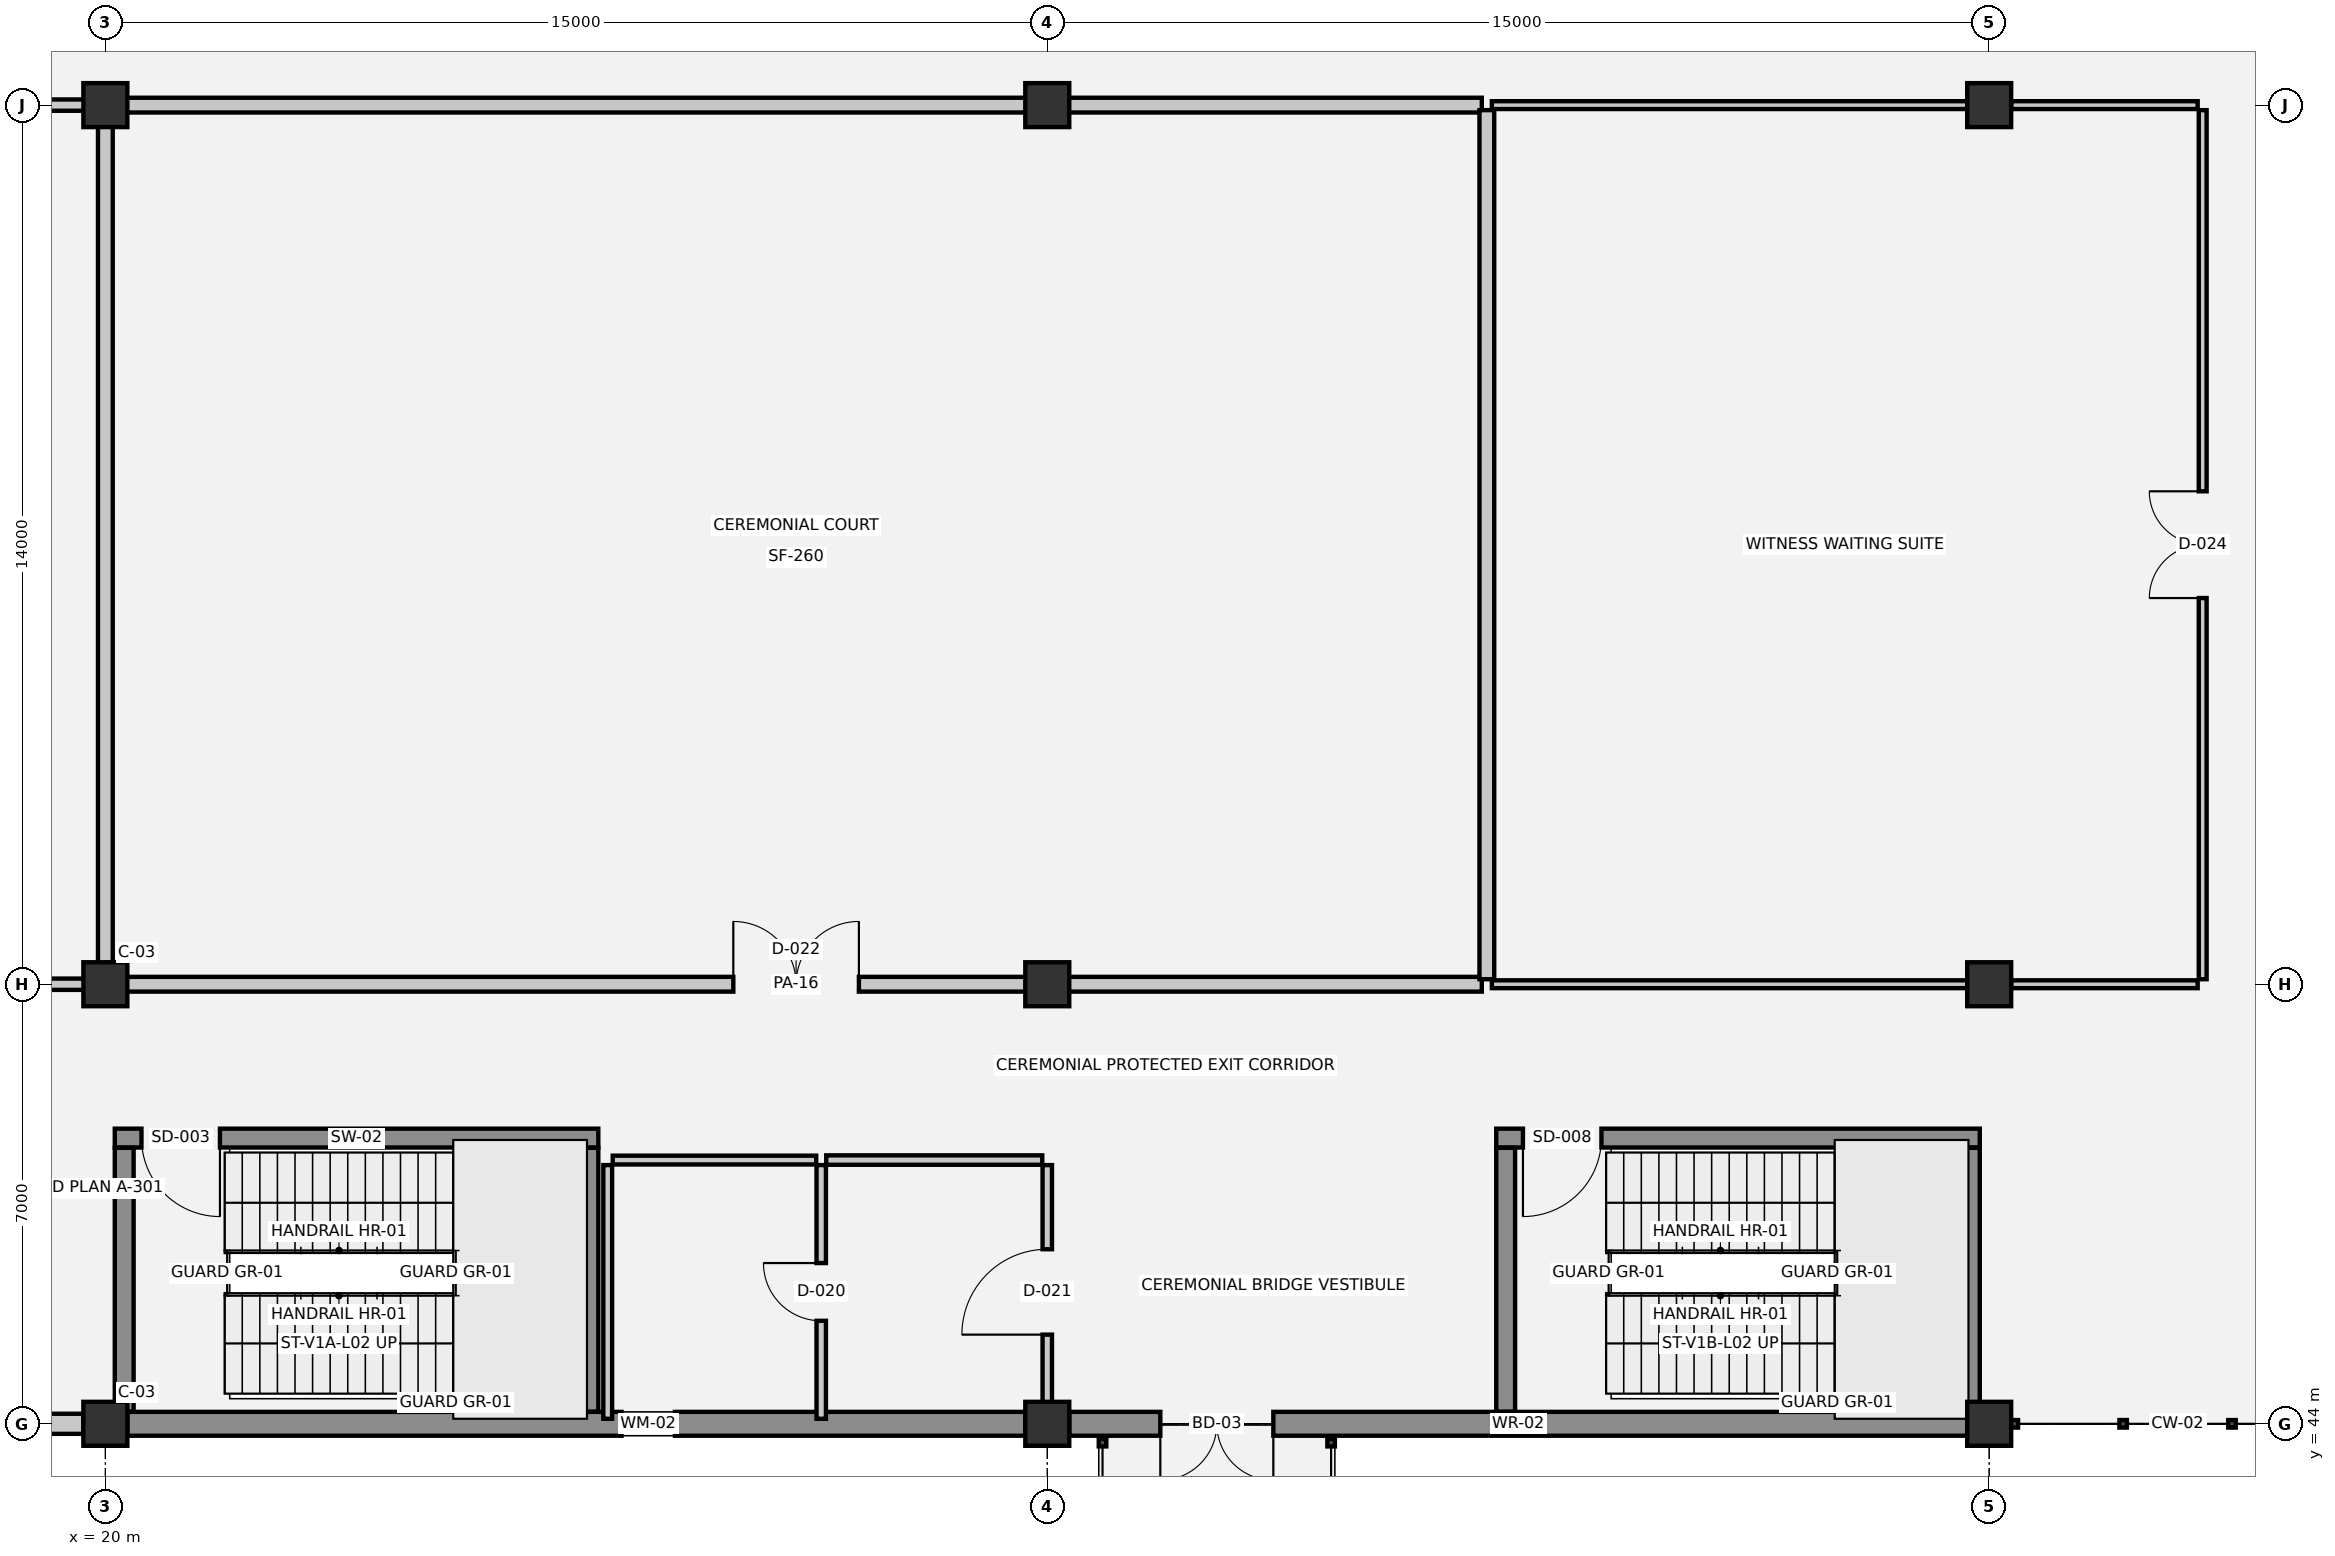
"""IFC4 building model, lengths in metres.
Left out: names, types, materials, properties, quantities, classifications, styles, units other than length and angle.
Written with IfcOpenShell. Run it as: python <this file> out.ifc"""

import sys

from ifc_helpers import new_model, si_unit, direction, frame, frame_2d, origin, origin_2d, place, context, subcontext, project, spatial, rectangle, extrude, element, fill, save


model = new_model("IFC4")
c1 = context("Model", 3, precision=1e-05, world=origin(), true_north=direction((0.0, 1.0)))
c2 = subcontext(c1, "Body", "Model", "MODEL_VIEW")
j1 = project(units=[si_unit("LENGTHUNIT", "METRE"), si_unit("PLANEANGLEUNIT", "RADIAN")], contexts=[c1])
p1 = place(None, origin())
s1 = spatial("IfcSite", under=j1, at=p1, CompositionType="ELEMENT")
p2 = place(p1, origin())
s2 = spatial("IfcBuilding", under=s1, at=p2, CompositionType="ELEMENT")
p3 = place(p2, frame((0.0, 0.0, 5.4)))
s3 = spatial("IfcBuildingStorey", under=s2, at=p3, CompositionType="ELEMENT", Elevation=5.4)
for number, where, z_axis, x_axis in (
    (1, (20.0, 44.0, 0.0), (0.0, 0.0, 1.0), (1.0, 0.0, 0.0)),
    (2, (20.0, 51.0, 0.0), (0.0, 0.0, 1.0), (1.0, 0.0, 0.0)),
    (3, (20.0, 65.0, 0.0), (0.0, 0.0, 1.0), (1.0, 0.0, 0.0)),
    (4, (35.0, 44.0, 0.0), (0.0, 0.0, 1.0), (1.0, 0.0, 0.0)),
    (5, (35.0, 51.0, 0.0), (0.0, 0.0, 1.0), (1.0, 0.0, 0.0)),
    (6, (35.0, 65.0, 0.0), (0.0, 0.0, 1.0), (1.0, 0.0, 0.0)),
    (7, (50.0, 44.0, 0.0), (0.0, 0.0, 1.0), (1.0, 0.0, 0.0)),
    (8, (50.0, 51.0, 0.0), (0.0, 0.0, 1.0), (1.0, 0.0, 0.0)),
    (9, (50.0, 65.0, 0.0), (0.0, 0.0, 1.0), (1.0, 0.0, 0.0)),
):
    element("IfcColumn", number, at=place(p3, frame(where, z_axis=z_axis, x_axis=x_axis)), inside=s3, PredefinedType="COLUMN", context=c2, shape_type="SweptSolid", body=[
        extrude(rectangle(XDim=0.7, YDim=0.7, at=origin_2d()), origin(), (0.0, 0.0, 1.0), 4.5),
    ])
p4 = place(p3, frame((49.65, 44.0, 0.0), z_axis=(0.0, 0.0, 1.0), x_axis=(-1.0, 0.0, 0.0)))
e10 = element("IfcWall", 10, at=p4, inside=s3, PredefinedType="STANDARD", context=c2, shape_type="SweptSolid", body=[
    extrude(rectangle(XDim=14.3, YDim=0.38, at=frame_2d((7.15, 0.0))), origin(), (0.0, 0.0, 1.0), 3.11),
])
p5 = place(p4, frame((11.05, 0.0, 0.0)))
e11 = element("IfcOpeningElement", 11, at=p5, cuts=e10, PredefinedType="OPENING", context=c2, shape_type="SweptSolid", body=[
    extrude(rectangle(XDim=1.8, YDim=2.25, at=frame_2d((0.9, 1.125))), frame((0.0, 0.2, 0.0), z_axis=(0.0, -1.0, 0.0), x_axis=(1.0, 0.0, 0.0)), (0.0, 0.0, 1.0), 0.4),
])
p6 = place(p3, frame((34.65, 44.0, 0.0), z_axis=(0.0, 0.0, 1.0), x_axis=(-1.0, 0.0, 0.0)))
e12 = element("IfcWall", 12, at=p6, inside=s3, PredefinedType="STANDARD", context=c2, shape_type="SweptSolid", body=[
    extrude(rectangle(XDim=14.3, YDim=0.38, at=frame_2d((7.15, 0.0))), origin(), (0.0, 0.0, 1.0), 3.11),
])
p7 = place(p6, frame((5.58, 0.0, 0.95)))
e13 = element("IfcOpeningElement", 13, at=p7, cuts=e12, PredefinedType="OPENING", context=c2, shape_type="SweptSolid", body=[
    extrude(rectangle(XDim=0.85, YDim=1.55, at=frame_2d((0.425, 0.775))), frame((0.0, 0.2, 0.0), z_axis=(0.0, -1.0, 0.0), x_axis=(1.0, 0.0, 0.0)), (0.0, 0.0, 1.0), 0.4),
])
p8 = place(p3, frame((19.65, 44.0, 0.0), z_axis=(0.0, 0.0, 1.0), x_axis=(-1.0, 0.0, 0.0)))
e14 = element("IfcWall", 14, at=p8, inside=s3, PredefinedType="SOLIDWALL", context=c2, shape_type="SweptSolid", body=[
    extrude(rectangle(XDim=4.8, YDim=0.32, at=frame_2d((2.4, 0.0))), origin(), (0.0, 0.0, 1.0), 3.11),
])
p9 = place(p8, frame((1.55, 0.0, 0.9)))
e15 = element("IfcOpeningElement", 15, at=p9, cuts=e14, PredefinedType="OPENING", context=c2, shape_type="SweptSolid", body=[
    extrude(rectangle(XDim=1.7, YDim=1.9, at=frame_2d((0.85, 0.95))), frame((0.0, 0.17, 0.0), z_axis=(0.0, -1.0, 0.0), x_axis=(1.0, 0.0, 0.0)), (0.0, 0.0, 1.0), 0.34),
])
p10 = place(p3, frame((27.85, 48.55, 0.0), z_axis=(0.0, 0.0, 1.0), x_axis=(-1.0, 0.0, 0.0)))
e16 = element("IfcWall", 16, at=p10, inside=s3, PredefinedType="SHEAR", context=c2, shape_type="SweptSolid", body=[
    extrude(rectangle(XDim=7.7, YDim=0.3, at=frame_2d((3.85, 0.0))), origin(), (0.0, 0.0, 1.0), 4.24),
])
p11 = place(p10, frame((6.025, 0.0, 0.0)))
e17 = element("IfcOpeningElement", 17, at=p11, cuts=e16, PredefinedType="OPENING", context=c2, shape_type="SweptSolid", body=[
    extrude(rectangle(XDim=1.25, YDim=2.15, at=frame_2d((0.625, 1.075))), frame((0.0, 0.16, 0.0), z_axis=(0.0, -1.0, 0.0), x_axis=(1.0, 0.0, 0.0)), (0.0, 0.0, 1.0), 0.32),
])
for number, where, z_axis, x_axis in (
    (18, (20.3, 48.395, 0.0), (0.0, 0.0, 1.0), (0.0, -1.0, 0.0)),
    (19, (27.7, 44.195, 0.0), (0.0, 0.0, 1.0), (0.0, 1.0, 0.0)),
):
    element("IfcWall", number, at=place(p3, frame(where, z_axis=z_axis, x_axis=x_axis)), inside=s3, PredefinedType="SHEAR", context=c2, shape_type="SweptSolid", body=[
        extrude(rectangle(XDim=4.2, YDim=0.3, at=frame_2d((2.1, 0.0))), origin(), (0.0, 0.0, 1.0), 4.24),
    ])
p12 = place(p3, frame((49.85, 48.55, 0.0), z_axis=(0.0, 0.0, 1.0), x_axis=(-1.0, 0.0, 0.0)))
e20 = element("IfcWall", 20, at=p12, inside=s3, PredefinedType="SHEAR", context=c2, shape_type="SweptSolid", body=[
    extrude(rectangle(XDim=7.7, YDim=0.3, at=frame_2d((3.85, 0.0))), origin(), (0.0, 0.0, 1.0), 4.24),
])
p13 = place(p12, frame((6.025, 0.0, 0.0)))
e21 = element("IfcOpeningElement", 21, at=p13, cuts=e20, PredefinedType="OPENING", context=c2, shape_type="SweptSolid", body=[
    extrude(rectangle(XDim=1.25, YDim=2.15, at=frame_2d((0.625, 1.075))), frame((0.0, 0.16, 0.0), z_axis=(0.0, -1.0, 0.0), x_axis=(1.0, 0.0, 0.0)), (0.0, 0.0, 1.0), 0.32),
])
for number, where, z_axis, x_axis in (
    (22, (42.3, 48.395, 0.0), (0.0, 0.0, 1.0), (0.0, -1.0, 0.0)),
    (23, (49.7, 44.195, 0.0), (0.0, 0.0, 1.0), (0.0, 1.0, 0.0)),
):
    element("IfcWall", number, at=place(p3, frame(where, z_axis=z_axis, x_axis=x_axis)), inside=s3, PredefinedType="SHEAR", context=c2, shape_type="SweptSolid", body=[
        extrude(rectangle(XDim=4.2, YDim=0.3, at=frame_2d((2.1, 0.0))), origin(), (0.0, 0.0, 1.0), 4.24),
    ])
p14 = place(p3, frame((28.08, 48.2, 0.0), z_axis=(0.0, 0.0, 1.0), x_axis=(1.0, 0.0, 0.0)))
e24 = element("IfcWall", 24, at=p14, inside=s3, PredefinedType="PLUMBINGWALL", context=c2, shape_type="SweptSolid", body=[
    extrude(rectangle(XDim=3.24, YDim=0.14, at=frame_2d((1.62, 0.0))), origin(), (0.0, 0.0, 1.0), 4.14),
])
p15 = place(p3, frame((31.48, 48.2, 0.0), z_axis=(0.0, 0.0, 1.0), x_axis=(1.0, 0.0, 0.0)))
e25 = element("IfcWall", 25, at=p15, inside=s3, PredefinedType="PARTITIONING", context=c2, shape_type="SweptSolid", body=[
    extrude(rectangle(XDim=3.44, YDim=0.15, at=frame_2d((1.72, 0.0))), origin(), (0.0, 0.0, 1.0), 4.14),
])
p16 = place(p3, frame((18.2, 51.0, 0.0), z_axis=(0.0, 0.0, 1.0), x_axis=(1.0, 0.0, 0.0)))
e26 = element("IfcWall", 26, at=p16, inside=s3, PredefinedType="PARTITIONING", context=c2, shape_type="SweptSolid", body=[
    extrude(rectangle(XDim=1.72, YDim=0.18, at=frame_2d((0.86, 0.0))), origin(), (0.0, 0.0, 1.0), 3.53),
])
p17 = place(p3, frame((20.08, 51.0, 0.0), z_axis=(0.0, 0.0, 1.0), x_axis=(1.0, 0.0, 0.0)))
e27 = element("IfcWall", 27, at=p17, inside=s3, PredefinedType="PARTITIONING", context=c2, shape_type="SweptSolid", body=[
    extrude(rectangle(XDim=21.84, YDim=0.235, at=frame_2d((10.92, 0.0))), origin(), (0.0, 0.0, 1.0), 3.28),
])
p18 = place(p17, frame((9.92, 0.0, 0.0)))
e28 = element("IfcOpeningElement", 28, at=p18, cuts=e27, PredefinedType="OPENING", context=c2, shape_type="SweptSolid", body=[
    extrude(rectangle(XDim=2.0, YDim=2.35, at=frame_2d((1.0, 1.175))), frame((0.0, 0.127, 0.0), z_axis=(0.0, -1.0, 0.0), x_axis=(1.0, 0.0, 0.0)), (0.0, 0.0, 1.0), 0.255),
])
p19 = place(p3, frame((42.08, 51.0, 0.0), z_axis=(0.0, 0.0, 1.0), x_axis=(1.0, 0.0, 0.0)))
e29 = element("IfcWall", 29, at=p19, inside=s3, PredefinedType="PARTITIONING", context=c2, shape_type="SweptSolid", body=[
    extrude(rectangle(XDim=8.27, YDim=0.125, at=frame_2d((4.135, 0.0))), origin(), (0.0, 0.0, 1.0), 3.28),
])
p20 = place(p3, frame((50.35, 51.0, 0.0), z_axis=(0.0, 0.0, 1.0), x_axis=(1.0, 0.0, 0.0)))
e30 = element("IfcWall", 30, at=p20, inside=s3, PredefinedType="PARTITIONING", context=c2, shape_type="SweptSolid", body=[
    extrude(rectangle(XDim=2.97, YDim=0.125, at=frame_2d((1.485, 0.0))), origin(), (0.0, 0.0, 1.0), 3.53),
])
p21 = place(p3, frame((6.08, 65.0, 0.0), z_axis=(0.0, 0.0, 1.0), x_axis=(1.0, 0.0, 0.0)))
e31 = element("IfcWall", 31, at=p21, inside=s3, PredefinedType="PARTITIONING", context=c2, shape_type="SweptSolid", body=[
    extrude(rectangle(XDim=13.84, YDim=0.18, at=frame_2d((6.92, 0.0))), origin(), (0.0, 0.0, 1.0), 3.53),
])
p22 = place(p21, frame((6.345, 0.0, 0.0)))
e32 = element("IfcOpeningElement", 32, at=p22, cuts=e31, PredefinedType="OPENING", context=c2, shape_type="SweptSolid", body=[
    extrude(rectangle(XDim=1.15, YDim=2.2, at=frame_2d((0.575, 1.1))), frame((0.0, 0.1, 0.0), z_axis=(0.0, -1.0, 0.0), x_axis=(1.0, 0.0, 0.0)), (0.0, 0.0, 1.0), 0.2),
])
p23 = place(p3, frame((20.08, 65.0, 0.0), z_axis=(0.0, 0.0, 1.0), x_axis=(1.0, 0.0, 0.0)))
e33 = element("IfcWall", 33, at=p23, inside=s3, PredefinedType="PARTITIONING", context=c2, shape_type="SweptSolid", body=[
    extrude(rectangle(XDim=21.84, YDim=0.235, at=frame_2d((10.92, 0.0))), origin(), (0.0, 0.0, 1.0), 3.28),
])
p24 = place(p3, frame((42.08, 65.0, 0.0), z_axis=(0.0, 0.0, 1.0), x_axis=(1.0, 0.0, 0.0)))
e34 = element("IfcWall", 34, at=p24, inside=s3, PredefinedType="PARTITIONING", context=c2, shape_type="SweptSolid", body=[
    extrude(rectangle(XDim=8.27, YDim=0.125, at=frame_2d((4.135, 0.0))), origin(), (0.0, 0.0, 1.0), 3.28),
])
p25 = place(p3, frame((50.35, 65.0, 0.0), z_axis=(0.0, 0.0, 1.0), x_axis=(1.0, 0.0, 0.0)))
e35 = element("IfcWall", 35, at=p25, inside=s3, PredefinedType="PARTITIONING", context=c2, shape_type="SweptSolid", body=[
    extrude(rectangle(XDim=2.97, YDim=0.125, at=frame_2d((1.485, 0.0))), origin(), (0.0, 0.0, 1.0), 3.53),
])
p26 = place(p3, frame((20.0, 51.08, 0.0), z_axis=(0.0, 0.0, 1.0), x_axis=(0.0, 1.0, 0.0)))
e36 = element("IfcWall", 36, at=p26, inside=s3, PredefinedType="PARTITIONING", context=c2, shape_type="SweptSolid", body=[
    extrude(rectangle(XDim=13.84, YDim=0.235, at=frame_2d((6.92, 0.0))), origin(), (0.0, 0.0, 1.0), 3.13),
])
p27 = place(p3, frame((28.0, 44.08, 0.0), z_axis=(0.0, 0.0, 1.0), x_axis=(0.0, 1.0, 0.0)))
e37 = element("IfcWall", 37, at=p27, inside=s3, PredefinedType="PLUMBINGWALL", context=c2, shape_type="SweptSolid", body=[
    extrude(rectangle(XDim=4.04, YDim=0.14, at=frame_2d((2.02, 0.0))), origin(), (0.0, 0.0, 1.0), 4.14),
])
p28 = place(p3, frame((31.4, 44.08, 0.0), z_axis=(0.0, 0.0, 1.0), x_axis=(0.0, 1.0, 0.0)))
e38 = element("IfcWall", 38, at=p28, inside=s3, PredefinedType="PARTITIONING", context=c2, shape_type="SweptSolid", body=[
    extrude(rectangle(XDim=4.04, YDim=0.15, at=frame_2d((2.02, 0.0))), origin(), (0.0, 0.0, 1.0), 4.14),
])
p29 = place(p28, frame((1.56, 0.0, 0.0)))
e39 = element("IfcOpeningElement", 39, at=p29, cuts=e38, PredefinedType="OPENING", context=c2, shape_type="SweptSolid", body=[
    extrude(rectangle(XDim=0.92, YDim=2.1, at=frame_2d((0.46, 1.05))), frame((0.0, 0.085, 0.0), z_axis=(0.0, -1.0, 0.0), x_axis=(1.0, 0.0, 0.0)), (0.0, 0.0, 1.0), 0.17),
])
p30 = place(p3, frame((35.0, 44.08, 0.0), z_axis=(0.0, 0.0, 1.0), x_axis=(0.0, 1.0, 0.0)))
e40 = element("IfcWall", 40, at=p30, inside=s3, PredefinedType="PARTITIONING", context=c2, shape_type="SweptSolid", body=[
    extrude(rectangle(XDim=4.04, YDim=0.15, at=frame_2d((2.02, 0.0))), origin(), (0.0, 0.0, 1.0), 3.58),
])
p31 = place(p30, frame((1.34, 0.0, 0.0)))
e41 = element("IfcOpeningElement", 41, at=p31, cuts=e40, PredefinedType="OPENING", context=c2, shape_type="SweptSolid", body=[
    extrude(rectangle(XDim=1.36, YDim=2.2, at=frame_2d((0.68, 1.1))), frame((0.0, 0.085, 0.0), z_axis=(0.0, -1.0, 0.0), x_axis=(1.0, 0.0, 0.0)), (0.0, 0.0, 1.0), 0.17),
])
p32 = place(p3, frame((42.0, 51.08, 0.0), z_axis=(0.0, 0.0, 1.0), x_axis=(0.0, 1.0, 0.0)))
e42 = element("IfcWall", 42, at=p32, inside=s3, PredefinedType="PARTITIONING", context=c2, shape_type="SweptSolid", body=[
    extrude(rectangle(XDim=13.84, YDim=0.235, at=frame_2d((6.92, 0.0))), origin(), (0.0, 0.0, 1.0), 4.14),
])
p33 = place(p3, frame((53.4, 51.08, 0.0), z_axis=(0.0, 0.0, 1.0), x_axis=(0.0, 1.0, 0.0)))
e43 = element("IfcWall", 43, at=p33, inside=s3, PredefinedType="PARTITIONING", context=c2, shape_type="SweptSolid", body=[
    extrude(rectangle(XDim=13.84, YDim=0.125, at=frame_2d((6.92, 0.0))), origin(), (0.0, 0.0, 1.0), 4.14),
])
p34 = place(p33, frame((6.07, 0.0, 0.0)))
e44 = element("IfcOpeningElement", 44, at=p34, cuts=e43, PredefinedType="OPENING", context=c2, shape_type="SweptSolid", body=[
    extrude(rectangle(XDim=1.7, YDim=2.3, at=frame_2d((0.85, 1.15))), frame((0.0, 0.073, 0.0), z_axis=(0.0, -1.0, 0.0), x_axis=(1.0, 0.0, 0.0)), (0.0, 0.0, 1.0), 0.145),
])
p35 = place(p5, origin())
e45 = element("IfcDoor", 45, at=p35, inside=s3, OperationType="DOUBLE_DOOR_SINGLE_SWING", PredefinedType="DOOR", context=c2, shape_type="SweptSolid", body=[
    extrude(rectangle(XDim=1.8, YDim=2.25, at=frame_2d((0.9, 1.125))), frame((0.0, 0.025, 0.0), z_axis=(0.0, -1.0, 0.0), x_axis=(1.0, 0.0, 0.0)), (0.0, 0.0, 1.0), 0.05),
])
fill(e11, e45)
p36 = place(p11, origin())
e46 = element("IfcDoor", 46, at=p36, inside=s3, OperationType="SINGLE_SWING_LEFT", PredefinedType="DOOR", context=c2, shape_type="SweptSolid", body=[
    extrude(rectangle(XDim=1.25, YDim=2.15, at=frame_2d((0.625, 1.075))), frame((0.0, 0.025, 0.0), z_axis=(0.0, -1.0, 0.0), x_axis=(1.0, 0.0, 0.0)), (0.0, 0.0, 1.0), 0.05),
])
fill(e17, e46)
p37 = place(p13, origin())
e47 = element("IfcDoor", 47, at=p37, inside=s3, OperationType="SINGLE_SWING_RIGHT", PredefinedType="DOOR", context=c2, shape_type="SweptSolid", body=[
    extrude(rectangle(XDim=1.25, YDim=2.15, at=frame_2d((0.625, 1.075))), frame((0.0, 0.025, 0.0), z_axis=(0.0, -1.0, 0.0), x_axis=(1.0, 0.0, 0.0)), (0.0, 0.0, 1.0), 0.05),
])
fill(e21, e47)
p38 = place(p29, origin())
e48 = element("IfcDoor", 48, at=p38, inside=s3, OperationType="SINGLE_SWING_RIGHT", PredefinedType="DOOR", context=c2, shape_type="SweptSolid", body=[
    extrude(rectangle(XDim=0.92, YDim=2.1, at=frame_2d((0.46, 1.05))), frame((0.0, 0.025, 0.0), z_axis=(0.0, -1.0, 0.0), x_axis=(1.0, 0.0, 0.0)), (0.0, 0.0, 1.0), 0.05),
])
fill(e39, e48)
p39 = place(p31, origin())
e49 = element("IfcDoor", 49, at=p39, inside=s3, OperationType="SINGLE_SWING_LEFT", PredefinedType="DOOR", context=c2, shape_type="SweptSolid", body=[
    extrude(rectangle(XDim=1.36, YDim=2.2, at=frame_2d((0.68, 1.1))), frame((0.0, 0.025, 0.0), z_axis=(0.0, -1.0, 0.0), x_axis=(1.0, 0.0, 0.0)), (0.0, 0.0, 1.0), 0.05),
])
fill(e41, e49)
p40 = place(p18, origin())
e50 = element("IfcDoor", 50, at=p40, inside=s3, OperationType="DOUBLE_DOOR_SINGLE_SWING", PredefinedType="DOOR", context=c2, shape_type="SweptSolid", body=[
    extrude(rectangle(XDim=2.0, YDim=2.35, at=frame_2d((1.0, 1.175))), frame((0.0, 0.025, 0.0), z_axis=(0.0, -1.0, 0.0), x_axis=(1.0, 0.0, 0.0)), (0.0, 0.0, 1.0), 0.05),
])
fill(e28, e50)
p41 = place(p34, origin())
e51 = element("IfcDoor", 51, at=p41, inside=s3, OperationType="DOUBLE_DOOR_SINGLE_SWING", PredefinedType="DOOR", context=c2, shape_type="SweptSolid", body=[
    extrude(rectangle(XDim=1.7, YDim=2.3, at=frame_2d((0.85, 1.15))), frame((0.0, 0.025, 0.0), z_axis=(0.0, -1.0, 0.0), x_axis=(1.0, 0.0, 0.0)), (0.0, 0.0, 1.0), 0.05),
])
fill(e44, e51)
p42 = place(p7, origin())
e52 = element("IfcWindow", 52, at=p42, inside=s3, PartitioningType="SINGLE_PANEL", PredefinedType="WINDOW", context=c2, shape_type="SweptSolid", body=[
    extrude(rectangle(XDim=0.85, YDim=1.55, at=frame_2d((0.425, 0.775))), frame((0.0, 0.03, 0.0), z_axis=(0.0, -1.0, 0.0), x_axis=(1.0, 0.0, 0.0)), (0.0, 0.0, 1.0), 0.06),
])
fill(e13, e52)
save(model, sys.argv[1])
